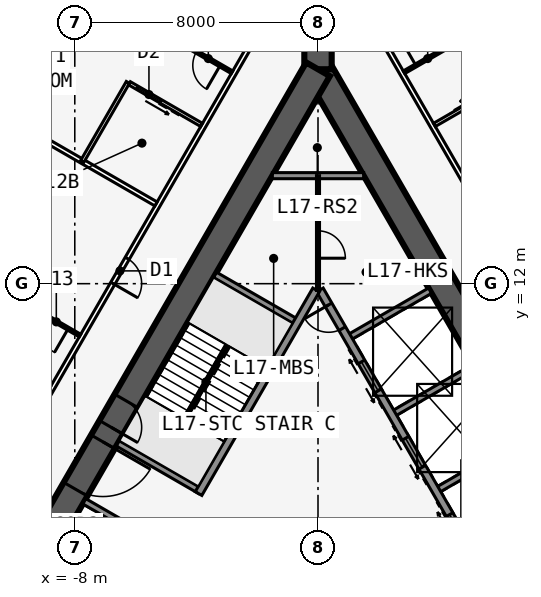
"""IFC4 building model, lengths in metres.
Left out: names, types, materials, properties, quantities, classifications, styles, units other than length and angle.
Written with IfcOpenShell. Run it as: python <this file> out.ifc"""

import sys

from ifc_helpers import new_model, si_unit, direction, frame, frame_2d, origin, place, context, subcontext, project, spatial, rectangle, extrude, element, fill, save


model = new_model("IFC4")
c1 = context("Model", 3, precision=1e-05, world=origin(), true_north=direction((0.0, 1.0)))
c2 = subcontext(c1, "Body", "Model", "MODEL_VIEW")
j1 = project(units=[si_unit("LENGTHUNIT", "METRE"), si_unit("PLANEANGLEUNIT", "RADIAN")], contexts=[c1])
p1 = place(None, origin())
s1 = spatial("IfcSite", under=j1, at=p1, CompositionType="ELEMENT")
p2 = place(p1, origin())
s2 = spatial("IfcBuilding", under=s1, at=p2, CompositionType="ELEMENT")
p3 = place(p2, frame((0.0, 0.0, 69.3)))
s3 = spatial("IfcBuildingStorey", under=s2, at=p3, CompositionType="ELEMENT", Elevation=69.3)
p4 = place(p3, frame((16.5, -9.526, 0.0), z_axis=(0.0, 0.0, 1.0), x_axis=(-0.499999749417, 0.866025548458, 0.0)))
e1 = element("IfcWall", 1, at=p4, inside=s3, PredefinedType="SHEAR", context=c2, shape_type="SweptSolid", body=[
    extrude(rectangle(XDim=33.0, YDim=0.9, at=frame_2d((16.5, 0.0))), origin(), (0.0, 0.0, 1.0), 3.4),
])
p5 = place(p4, frame((14.15, 0.0, 0.0)))
e2 = element("IfcOpeningElement", 2, at=p5, cuts=e1, PredefinedType="OPENING", context=c2, shape_type="SweptSolid", body=[
    extrude(rectangle(XDim=1.8, YDim=2.13, at=frame_2d((0.9, 1.065))), frame((0.0, 0.46, 0.0), z_axis=(0.0, -1.0, 0.0), x_axis=(1.0, 0.0, 0.0)), (0.0, 0.0, 1.0), 0.92),
])
p6 = place(p4, frame((12.6, 0.0, 0.0)))
e3 = element("IfcOpeningElement", 3, at=p6, cuts=e1, PredefinedType="OPENING", context=c2, shape_type="SweptSolid", body=[
    extrude(rectangle(XDim=1.0, YDim=2.13, at=frame_2d((0.5, 1.065))), frame((0.0, 0.46, 0.0), z_axis=(0.0, -1.0, 0.0), x_axis=(1.0, 0.0, 0.0)), (0.0, 0.0, 1.0), 0.92),
])
p7 = place(p3, frame((5.379, 2.586, 0.0), z_axis=(0.0, 0.0, 1.0), x_axis=(-0.500001375892, 0.866024609411, 0.0)))
e4 = element("IfcWall", 4, at=p7, inside=s3, PredefinedType="SOLIDWALL", context=c2, shape_type="SweptSolid", body=[
    extrude(rectangle(XDim=10.633, YDim=0.25, at=frame_2d((5.316, 0.0))), origin(), (0.0, 0.0, 1.0), 3.235),
])
p8 = place(p7, frame((9.164, 0.0, 0.0)))
e5 = element("IfcOpeningElement", 5, at=p8, cuts=e4, PredefinedType="OPENING", context=c2, shape_type="SweptSolid", body=[
    extrude(rectangle(XDim=0.9, YDim=2.13, at=frame_2d((0.45, 1.065))), frame((0.0, 0.135, 0.0), z_axis=(0.0, -1.0, 0.0), x_axis=(1.0, 0.0, 0.0)), (0.0, 0.0, 1.0), 0.27),
])
p9 = place(p7, frame((1.0, 0.0, 0.0)))
e6 = element("IfcOpeningElement", 6, at=p9, cuts=e4, PredefinedType="OPENING", context=c2, shape_type="SweptSolid", body=[
    extrude(rectangle(XDim=1.1, YDim=2.13, at=frame_2d((0.55, 1.065))), frame((0.0, 0.135, 0.0), z_axis=(0.0, -1.0, 0.0), x_axis=(1.0, 0.0, 0.0)), (0.0, 0.0, 1.0), 0.27),
])
p10 = place(p7, frame((3.9, 0.0, 0.0)))
e7 = element("IfcOpeningElement", 7, at=p10, cuts=e4, PredefinedType="OPENING", context=c2, shape_type="SweptSolid", body=[
    extrude(rectangle(XDim=1.1, YDim=2.13, at=frame_2d((0.55, 1.065))), frame((0.0, 0.135, 0.0), z_axis=(0.0, -1.0, 0.0), x_axis=(1.0, 0.0, 0.0)), (0.0, 0.0, 1.0), 0.27),
])
p11 = place(p7, frame((6.8, 0.0, 0.0)))
e8 = element("IfcOpeningElement", 8, at=p11, cuts=e4, PredefinedType="OPENING", context=c2, shape_type="SweptSolid", body=[
    extrude(rectangle(XDim=1.1, YDim=2.13, at=frame_2d((0.55, 1.065))), frame((0.0, 0.135, 0.0), z_axis=(0.0, -1.0, 0.0), x_axis=(1.0, 0.0, 0.0)), (0.0, 0.0, 1.0), 0.27),
])
for number, where, z_axis, x_axis in (
    (9, (3.879, 5.184, 0.0), (0.0, 0.0, 1.0), (0.866, 0.5, 0.0)),
    (10, (2.429, 7.696, 0.0), (0.0, 0.0, 1.0), (0.866, 0.5, 0.0)),
    (11, (0.979, 10.207, 0.0), (0.0, 0.0, 1.0), (0.866, 0.5, 0.0)),
):
    element("IfcWall", number, at=place(p3, frame(where, z_axis=z_axis, x_axis=x_axis)), inside=s3, PredefinedType="SOLIDWALL", context=c2, shape_type="SweptSolid", body=[
        extrude(rectangle(XDim=3.125, YDim=0.2, at=frame_2d((1.562, 0.0))), origin(), (0.0, 0.0, 1.0), 3.235),
    ])
p12 = place(p3, frame((0.0, 19.052, 0.0), z_axis=(0.0, 0.0, 1.0), x_axis=(-0.499999749417, -0.866025548458, 0.0)))
e12 = element("IfcWall", 12, at=p12, inside=s3, PredefinedType="SHEAR", context=c2, shape_type="SweptSolid", body=[
    extrude(rectangle(XDim=33.0, YDim=0.9, at=frame_2d((16.5, 0.0))), origin(), (0.0, 0.0, 1.0), 3.4),
])
p13 = place(p12, frame((14.15, 0.0, 0.0)))
e13 = element("IfcOpeningElement", 13, at=p13, cuts=e12, PredefinedType="OPENING", context=c2, shape_type="SweptSolid", body=[
    extrude(rectangle(XDim=1.8, YDim=2.13, at=frame_2d((0.9, 1.065))), frame((0.0, 0.46, 0.0), z_axis=(0.0, -1.0, 0.0), x_axis=(1.0, 0.0, 0.0)), (0.0, 0.0, 1.0), 0.92),
])
p14 = place(p12, frame((12.6, 0.0, 0.0)))
e14 = element("IfcOpeningElement", 14, at=p14, cuts=e12, PredefinedType="OPENING", context=c2, shape_type="SweptSolid", body=[
    extrude(rectangle(XDim=1.0, YDim=2.13, at=frame_2d((0.5, 1.065))), frame((0.0, 0.46, 0.0), z_axis=(0.0, -1.0, 0.0), x_axis=(1.0, 0.0, 0.0)), (0.0, 0.0, 1.0), 0.92),
])
p15 = place(p3, frame((-0.062, 11.794, 0.0), z_axis=(0.0, 0.0, 1.0), x_axis=(-0.500006680225, -0.86602154692, 0.0)))
e15 = element("IfcWall", 15, at=p15, inside=s3, PredefinedType="SOLIDWALL", context=c2, shape_type="SweptSolid", body=[
    extrude(rectangle(XDim=7.733, YDim=0.25, at=frame_2d((3.866, 0.0))), origin(), (0.0, 0.0, 1.0), 3.235),
])
for number, where, z_axis, x_axis in (
    (16, (-0.679, 10.727, 0.0), (0.0, 0.0, 1.0), (-0.866, 0.5, 0.0)),
    (17, (-3.879, 5.184, 0.0), (0.0, 0.0, 1.0), (-0.866, 0.5, 0.0)),
    (18, (-4.979, 3.279, 0.0), (0.0, 0.0, 1.0), (-0.866, 0.5, 0.0)),
):
    element("IfcWall", number, at=place(p3, frame(where, z_axis=z_axis, x_axis=x_axis)), inside=s3, PredefinedType="SOLIDWALL", context=c2, shape_type="SweptSolid", body=[
        extrude(rectangle(XDim=3.125, YDim=0.2, at=frame_2d((1.562, 0.0))), origin(), (0.0, 0.0, 1.0), 3.235),
    ])
p16 = place(p3, frame((0.0, 19.052, 0.0), z_axis=(0.0, 0.0, 1.0), x_axis=(0.0, 1.0, 0.0)))
e19 = element("IfcWall", 19, at=p16, inside=s3, PredefinedType="SHEAR", context=c2, shape_type="SweptSolid", body=[
    extrude(rectangle(XDim=4.746, YDim=0.9, at=frame_2d((2.373, 0.0))), origin(), (0.0, 0.0, 1.0), 3.4),
])
p17 = place(p16, frame((1.8, 0.0, 0.0)))
e20 = element("IfcOpeningElement", 20, at=p17, cuts=e19, PredefinedType="OPENING", context=c2, shape_type="SweptSolid", body=[
    extrude(rectangle(XDim=1.8, YDim=2.13, at=frame_2d((0.9, 1.065))), frame((0.0, 0.46, 0.0), z_axis=(0.0, -1.0, 0.0), x_axis=(1.0, 0.0, 0.0)), (0.0, 0.0, 1.0), 0.92),
])
p18 = place(p3, frame((20.027, -10.985, 0.0), z_axis=(0.0, 0.0, 1.0), x_axis=(-0.500001677587, 0.866024435227, 0.0)))
e21 = element("IfcWall", 21, at=p18, inside=s3, PredefinedType="PARTITIONING", context=c2, shape_type="SweptSolid", body=[
    extrude(rectangle(XDim=39.054, YDim=0.15, at=frame_2d((19.527, 0.0))), origin(), (0.0, 0.0, 1.0), 3.235),
])
p19 = place(p18, frame((0.352, 0.0, 0.0)))
e22 = element("IfcOpeningElement", 22, at=p19, cuts=e21, PredefinedType="OPENING", context=c2, shape_type="SweptSolid", body=[
    extrude(rectangle(XDim=0.95, YDim=2.13, at=frame_2d((0.475, 1.065))), frame((0.0, 0.085, 0.0), z_axis=(0.0, -1.0, 0.0), x_axis=(1.0, 0.0, 0.0)), (0.0, 0.0, 1.0), 0.17),
])
p20 = place(p18, frame((6.552, 0.0, 0.0)))
e23 = element("IfcOpeningElement", 23, at=p20, cuts=e21, PredefinedType="OPENING", context=c2, shape_type="SweptSolid", body=[
    extrude(rectangle(XDim=0.95, YDim=2.13, at=frame_2d((0.475, 1.065))), frame((0.0, 0.085, 0.0), z_axis=(0.0, -1.0, 0.0), x_axis=(1.0, 0.0, 0.0)), (0.0, 0.0, 1.0), 0.17),
])
p21 = place(p18, frame((16.552, 0.0, 0.0)))
e24 = element("IfcOpeningElement", 24, at=p21, cuts=e21, PredefinedType="OPENING", context=c2, shape_type="SweptSolid", body=[
    extrude(rectangle(XDim=0.95, YDim=2.13, at=frame_2d((0.475, 1.065))), frame((0.0, 0.085, 0.0), z_axis=(0.0, -1.0, 0.0), x_axis=(1.0, 0.0, 0.0)), (0.0, 0.0, 1.0), 0.17),
])
p22 = place(p18, frame((25.952, 0.0, 0.0)))
e25 = element("IfcOpeningElement", 25, at=p22, cuts=e21, PredefinedType="OPENING", context=c2, shape_type="SweptSolid", body=[
    extrude(rectangle(XDim=0.95, YDim=2.13, at=frame_2d((0.475, 1.065))), frame((0.0, 0.085, 0.0), z_axis=(0.0, -1.0, 0.0), x_axis=(1.0, 0.0, 0.0)), (0.0, 0.0, 1.0), 0.17),
])
p23 = place(p18, frame((36.546, 0.0, 0.0)))
e26 = element("IfcOpeningElement", 26, at=p23, cuts=e21, PredefinedType="OPENING", context=c2, shape_type="SweptSolid", body=[
    extrude(rectangle(XDim=0.95, YDim=2.13, at=frame_2d((0.475, 1.065))), frame((0.0, 0.085, 0.0), z_axis=(0.0, -1.0, 0.0), x_axis=(1.0, 0.0, 0.0)), (0.0, 0.0, 1.0), 0.17),
])
p24 = place(p3, frame((2.829, 18.954, 0.0), z_axis=(0.0, 0.0, 1.0), x_axis=(0.866020536561, 0.500008430184, 0.0)))
e27 = element("IfcWall", 27, at=p24, inside=s3, PredefinedType="PARTITIONING", context=c2, shape_type="SweptSolid", body=[
    extrude(rectangle(XDim=8.72, YDim=0.1, at=frame_2d((4.36, 0.0))), origin(), (0.0, 0.0, 1.0), 2.389),
])
p25 = place(p24, frame((0.45, 0.0, 0.0)))
e28 = element("IfcOpeningElement", 28, at=p25, cuts=e27, PredefinedType="OPENING", context=c2, shape_type="SweptSolid", body=[
    extrude(rectangle(XDim=0.9, YDim=2.13, at=frame_2d((0.45, 1.065))), frame((0.0, 0.06, 0.0), z_axis=(0.0, -1.0, 0.0), x_axis=(1.0, 0.0, 0.0)), (0.0, 0.0, 1.0), 0.12),
])
p26 = place(p3, frame((3.829, 17.221, 0.0), z_axis=(0.0, 0.0, 1.0), x_axis=(0.865997131366, 0.500048966069, 0.0)))
e29 = element("IfcWall", 29, at=p26, inside=s3, PredefinedType="PLUMBINGWALL", context=c2, shape_type="SweptSolid", body=[
    extrude(rectangle(XDim=2.74, YDim=0.12, at=frame_2d((1.37, 0.0))), origin(), (0.0, 0.0, 1.0), 3.235),
])
p27 = place(p26, frame((1.55, 0.0, 0.0)))
e30 = element("IfcOpeningElement", 30, at=p27, cuts=e29, PredefinedType="OPENING", context=c2, shape_type="SweptSolid", body=[
    extrude(rectangle(XDim=0.9, YDim=2.13, at=frame_2d((0.45, 1.065))), frame((0.0, 0.07, 0.0), z_axis=(0.0, -1.0, 0.0), x_axis=(1.0, 0.0, 0.0)), (0.0, 0.0, 1.0), 0.14),
])
p28 = place(p3, frame((-0.5, 22.836, 0.0), z_axis=(0.0, 0.0, 1.0), x_axis=(-0.500001677587, -0.866024435227, 0.0)))
e31 = element("IfcWall", 31, at=p28, inside=s3, PredefinedType="PARTITIONING", context=c2, shape_type="SweptSolid", body=[
    extrude(rectangle(XDim=39.054, YDim=0.15, at=frame_2d((19.527, 0.0))), origin(), (0.0, 0.0, 1.0), 3.235),
])
p29 = place(p28, frame((1.558, 0.0, 0.0)))
e32 = element("IfcOpeningElement", 32, at=p29, cuts=e31, PredefinedType="OPENING", context=c2, shape_type="SweptSolid", body=[
    extrude(rectangle(XDim=0.95, YDim=2.13, at=frame_2d((0.475, 1.065))), frame((0.0, 0.085, 0.0), z_axis=(0.0, -1.0, 0.0), x_axis=(1.0, 0.0, 0.0)), (0.0, 0.0, 1.0), 0.17),
])
p30 = place(p28, frame((11.552, 0.0, 0.0)))
e33 = element("IfcOpeningElement", 33, at=p30, cuts=e31, PredefinedType="OPENING", context=c2, shape_type="SweptSolid", body=[
    extrude(rectangle(XDim=0.95, YDim=2.13, at=frame_2d((0.475, 1.065))), frame((0.0, 0.085, 0.0), z_axis=(0.0, -1.0, 0.0), x_axis=(1.0, 0.0, 0.0)), (0.0, 0.0, 1.0), 0.17),
])
p31 = place(p28, frame((20.952, 0.0, 0.0)))
e34 = element("IfcOpeningElement", 34, at=p31, cuts=e31, PredefinedType="OPENING", context=c2, shape_type="SweptSolid", body=[
    extrude(rectangle(XDim=0.95, YDim=2.13, at=frame_2d((0.475, 1.065))), frame((0.0, 0.085, 0.0), z_axis=(0.0, -1.0, 0.0), x_axis=(1.0, 0.0, 0.0)), (0.0, 0.0, 1.0), 0.17),
])
p32 = place(p28, frame((27.752, 0.0, 0.0)))
e35 = element("IfcOpeningElement", 35, at=p32, cuts=e31, PredefinedType="OPENING", context=c2, shape_type="SweptSolid", body=[
    extrude(rectangle(XDim=0.95, YDim=2.13, at=frame_2d((0.475, 1.065))), frame((0.0, 0.085, 0.0), z_axis=(0.0, -1.0, 0.0), x_axis=(1.0, 0.0, 0.0)), (0.0, 0.0, 1.0), 0.17),
])
p33 = place(p28, frame((36.546, 0.0, 0.0)))
e36 = element("IfcOpeningElement", 36, at=p33, cuts=e31, PredefinedType="OPENING", context=c2, shape_type="SweptSolid", body=[
    extrude(rectangle(XDim=0.95, YDim=2.13, at=frame_2d((0.475, 1.065))), frame((0.0, 0.085, 0.0), z_axis=(0.0, -1.0, 0.0), x_axis=(1.0, 0.0, 0.0)), (0.0, 0.0, 1.0), 0.17),
])
p34 = place(p3, frame((-2.829, 18.954, 0.0), z_axis=(0.0, 0.0, 1.0), x_axis=(-0.866020536561, 0.500008430184, 0.0)))
e37 = element("IfcWall", 37, at=p34, inside=s3, PredefinedType="PARTITIONING", context=c2, shape_type="SweptSolid", body=[
    extrude(rectangle(XDim=8.72, YDim=0.1, at=frame_2d((4.36, 0.0))), origin(), (0.0, 0.0, 1.0), 2.389),
])
p35 = place(p34, frame((0.45, 0.0, 0.0)))
e38 = element("IfcOpeningElement", 38, at=p35, cuts=e37, PredefinedType="OPENING", context=c2, shape_type="SweptSolid", body=[
    extrude(rectangle(XDim=0.9, YDim=2.13, at=frame_2d((0.45, 1.065))), frame((0.0, 0.06, 0.0), z_axis=(0.0, -1.0, 0.0), x_axis=(1.0, 0.0, 0.0)), (0.0, 0.0, 1.0), 0.12),
])
p36 = place(p3, frame((-5.329, 14.623, 0.0), z_axis=(0.0, 0.0, 1.0), x_axis=(-0.866018409083, 0.500012114982, 0.0)))
e39 = element("IfcWall", 39, at=p36, inside=s3, PredefinedType="PARTITIONING", context=c2, shape_type="SweptSolid", body=[
    extrude(rectangle(XDim=9.485, YDim=0.15, at=frame_2d((4.742, 0.0))), origin(), (0.0, 0.0, 1.0), 2.389),
])
p37 = place(p3, frame((-7.829, 10.293, 0.0), z_axis=(0.0, 0.0, 1.0), x_axis=(-0.866016302457, 0.50001576363, 0.0)))
e40 = element("IfcWall", 40, at=p37, inside=s3, PredefinedType="PARTITIONING", context=c2, shape_type="SweptSolid", body=[
    extrude(rectangle(XDim=9.943, YDim=0.1, at=frame_2d((4.972, 0.0))), origin(), (0.0, 0.0, 1.0), 2.389),
])
p38 = place(p37, frame((0.45, 0.0, 0.0)))
e41 = element("IfcOpeningElement", 41, at=p38, cuts=e40, PredefinedType="OPENING", context=c2, shape_type="SweptSolid", body=[
    extrude(rectangle(XDim=0.9, YDim=2.13, at=frame_2d((0.45, 1.065))), frame((0.0, 0.06, 0.0), z_axis=(0.0, -1.0, 0.0), x_axis=(1.0, 0.0, 0.0)), (0.0, 0.0, 1.0), 0.12),
])
p39 = place(p3, frame((-6.253, 18.622, 0.0), z_axis=(0.0, 0.0, 1.0), x_axis=(-0.499990139034, -0.866031096941, 0.0)))
e42 = element("IfcWall", 42, at=p39, inside=s3, PredefinedType="PLUMBINGWALL", context=c2, shape_type="SweptSolid", body=[
    extrude(rectangle(XDim=3.0, YDim=0.12, at=frame_2d((1.5, 0.0))), origin(), (0.0, 0.0, 1.0), 3.235),
])
p40 = place(p3, frame((-3.829, 17.221, 0.0), z_axis=(0.0, 0.0, 1.0), x_axis=(-0.865997131366, 0.500048966069, 0.0)))
e43 = element("IfcWall", 43, at=p40, inside=s3, PredefinedType="PLUMBINGWALL", context=c2, shape_type="SweptSolid", body=[
    extrude(rectangle(XDim=2.74, YDim=0.12, at=frame_2d((1.37, 0.0))), origin(), (0.0, 0.0, 1.0), 3.235),
])
p41 = place(p40, frame((1.55, 0.0, 0.0)))
e44 = element("IfcOpeningElement", 44, at=p41, cuts=e43, PredefinedType="OPENING", context=c2, shape_type="SweptSolid", body=[
    extrude(rectangle(XDim=0.9, YDim=2.13, at=frame_2d((0.45, 1.065))), frame((0.0, 0.07, 0.0), z_axis=(0.0, -1.0, 0.0), x_axis=(1.0, 0.0, 0.0)), (0.0, 0.0, 1.0), 0.14),
])
p42 = place(p3, frame((-1.501, 15.552, 0.0), z_axis=(0.0, 0.0, 1.0), x_axis=(1.0, 0.0, 0.0)))
e45 = element("IfcWall", 45, at=p42, inside=s3, PredefinedType="SOLIDWALL", context=c2, shape_type="SweptSolid", body=[
    extrude(rectangle(XDim=3.002, YDim=0.2, at=frame_2d((1.501, 0.0))), origin(), (0.0, 0.0, 1.0), 3.235),
])
p43 = place(p3, frame((0.0, 15.552, 0.0), z_axis=(0.0, 0.0, 1.0), x_axis=(0.0, -1.0, 0.0)))
e46 = element("IfcWall", 46, at=p43, inside=s3, PredefinedType="PARTITIONING", context=c2, shape_type="SweptSolid", body=[
    extrude(rectangle(XDim=3.775, YDim=0.1, at=frame_2d((1.888, 0.0))), origin(), (0.0, 0.0, 1.0), 3.235),
])
p44 = place(p43, frame((1.815, 0.0, 0.0)))
e47 = element("IfcOpeningElement", 47, at=p44, cuts=e46, PredefinedType="OPENING", context=c2, shape_type="SweptSolid", body=[
    extrude(rectangle(XDim=0.9, YDim=2.13, at=frame_2d((0.45, 1.065))), frame((0.0, 0.06, 0.0), z_axis=(0.0, -1.0, 0.0), x_axis=(1.0, 0.0, 0.0)), (0.0, 0.0, 1.0), 0.12),
])
p45 = place(p3, frame((-2.988, 9.978, 0.0), z_axis=(0.0, 0.0, 1.0), x_axis=(-0.499992232847, -0.866029888106, 0.0)))
e48 = element("IfcWall", 48, at=p45, inside=s3, PredefinedType="SOLIDWALL", context=c2, shape_type="SweptSolid", body=[
    extrude(rectangle(XDim=2.794, YDim=0.1, at=frame_2d((1.397, 0.0))), origin(), (0.0, 0.0, 1.0), 3.4),
])
p46 = place(p25, origin())
e49 = element("IfcDoor", 49, at=p46, inside=s3, OperationType="SINGLE_SWING_LEFT", PredefinedType="DOOR", context=c2, shape_type="SweptSolid", body=[
    extrude(rectangle(XDim=0.9, YDim=2.13, at=frame_2d((0.45, 1.065))), frame((0.0, 0.025, 0.0), z_axis=(0.0, -1.0, 0.0), x_axis=(1.0, 0.0, 0.0)), (0.0, 0.0, 1.0), 0.05),
])
fill(e28, e49)
p47 = place(p35, origin())
e50 = element("IfcDoor", 50, at=p47, inside=s3, OperationType="SINGLE_SWING_LEFT", PredefinedType="DOOR", context=c2, shape_type="SweptSolid", body=[
    extrude(rectangle(XDim=0.9, YDim=2.13, at=frame_2d((0.45, 1.065))), frame((0.0, 0.025, 0.0), z_axis=(0.0, -1.0, 0.0), x_axis=(1.0, 0.0, 0.0)), (0.0, 0.0, 1.0), 0.05),
])
fill(e38, e50)
p48 = place(p38, origin())
e51 = element("IfcDoor", 51, at=p48, inside=s3, OperationType="SINGLE_SWING_LEFT", PredefinedType="DOOR", context=c2, shape_type="SweptSolid", body=[
    extrude(rectangle(XDim=0.9, YDim=2.13, at=frame_2d((0.45, 1.065))), frame((0.0, 0.025, 0.0), z_axis=(0.0, -1.0, 0.0), x_axis=(1.0, 0.0, 0.0)), (0.0, 0.0, 1.0), 0.05),
])
fill(e41, e51)
p49 = place(p41, origin())
e52 = element("IfcDoor", 52, at=p49, inside=s3, OperationType="SLIDING_TO_LEFT", PredefinedType="DOOR", context=c2, shape_type="SweptSolid", body=[
    extrude(rectangle(XDim=0.9, YDim=2.13, at=frame_2d((0.45, 1.065))), frame((0.0, 0.025, 0.0), z_axis=(0.0, -1.0, 0.0), x_axis=(1.0, 0.0, 0.0)), (0.0, 0.0, 1.0), 0.05),
])
fill(e44, e52)
p50 = place(p30, origin())
e53 = element("IfcDoor", 53, at=p50, inside=s3, OperationType="SINGLE_SWING_RIGHT", PredefinedType="DOOR", context=c2, shape_type="SweptSolid", body=[
    extrude(rectangle(XDim=0.95, YDim=2.13, at=frame_2d((0.475, 1.065))), frame((0.0, 0.025, 0.0), z_axis=(0.0, -1.0, 0.0), x_axis=(1.0, 0.0, 0.0)), (0.0, 0.0, 1.0), 0.05),
])
fill(e33, e53)
p51 = place(p13, origin())
e54 = element("IfcDoor", 54, at=p51, inside=s3, OperationType="DOUBLE_DOOR_SINGLE_SWING", PredefinedType="DOOR", context=c2, shape_type="SweptSolid", body=[
    extrude(rectangle(XDim=1.8, YDim=2.13, at=frame_2d((0.9, 1.065))), frame((0.0, 0.025, 0.0), z_axis=(0.0, -1.0, 0.0), x_axis=(1.0, 0.0, 0.0)), (0.0, 0.0, 1.0), 0.05),
])
fill(e13, e54)
p52 = place(p14, origin())
e55 = element("IfcDoor", 55, at=p52, inside=s3, OperationType="SINGLE_SWING_RIGHT", PredefinedType="DOOR", context=c2, shape_type="SweptSolid", body=[
    extrude(rectangle(XDim=1.0, YDim=2.13, at=frame_2d((0.5, 1.065))), frame((0.0, 0.025, 0.0), z_axis=(0.0, -1.0, 0.0), x_axis=(1.0, 0.0, 0.0)), (0.0, 0.0, 1.0), 0.05),
])
fill(e14, e55)
p53 = place(p8, origin())
e56 = element("IfcDoor", 56, at=p53, inside=s3, OperationType="SINGLE_SWING_RIGHT", PredefinedType="DOOR", context=c2, shape_type="SweptSolid", body=[
    extrude(rectangle(XDim=0.9, YDim=2.13, at=frame_2d((0.45, 1.065))), frame((0.0, 0.025, 0.0), z_axis=(0.0, -1.0, 0.0), x_axis=(1.0, 0.0, 0.0)), (0.0, 0.0, 1.0), 0.05),
])
fill(e5, e56)
p54 = place(p44, origin())
e57 = element("IfcDoor", 57, at=p54, inside=s3, OperationType="SINGLE_SWING_RIGHT", PredefinedType="DOOR", context=c2, shape_type="SweptSolid", body=[
    extrude(rectangle(XDim=0.9, YDim=2.13, at=frame_2d((0.45, 1.065))), frame((0.0, 0.025, 0.0), z_axis=(0.0, -1.0, 0.0), x_axis=(1.0, 0.0, 0.0)), (0.0, 0.0, 1.0), 0.05),
])
fill(e47, e57)
p55 = place(p9, origin())
e58 = element("IfcDoor", 58, at=p55, inside=s3, OperationType="DOUBLE_DOOR_SLIDING", PredefinedType="USERDEFINED", context=c2, shape_type="SweptSolid", body=[
    extrude(rectangle(XDim=1.1, YDim=2.13, at=frame_2d((0.55, 1.065))), frame((0.0, 0.025, 0.0), z_axis=(0.0, -1.0, 0.0), x_axis=(1.0, 0.0, 0.0)), (0.0, 0.0, 1.0), 0.05),
])
fill(e6, e58)
p56 = place(p10, origin())
e59 = element("IfcDoor", 59, at=p56, inside=s3, OperationType="DOUBLE_DOOR_SLIDING", PredefinedType="USERDEFINED", context=c2, shape_type="SweptSolid", body=[
    extrude(rectangle(XDim=1.1, YDim=2.13, at=frame_2d((0.55, 1.065))), frame((0.0, 0.025, 0.0), z_axis=(0.0, -1.0, 0.0), x_axis=(1.0, 0.0, 0.0)), (0.0, 0.0, 1.0), 0.05),
])
fill(e7, e59)
p57 = place(p11, origin())
e60 = element("IfcDoor", 60, at=p57, inside=s3, OperationType="DOUBLE_DOOR_SLIDING", PredefinedType="USERDEFINED", context=c2, shape_type="SweptSolid", body=[
    extrude(rectangle(XDim=1.1, YDim=2.13, at=frame_2d((0.55, 1.065))), frame((0.0, 0.025, 0.0), z_axis=(0.0, -1.0, 0.0), x_axis=(1.0, 0.0, 0.0)), (0.0, 0.0, 1.0), 0.05),
])
fill(e8, e60)
save(model, sys.argv[1])
